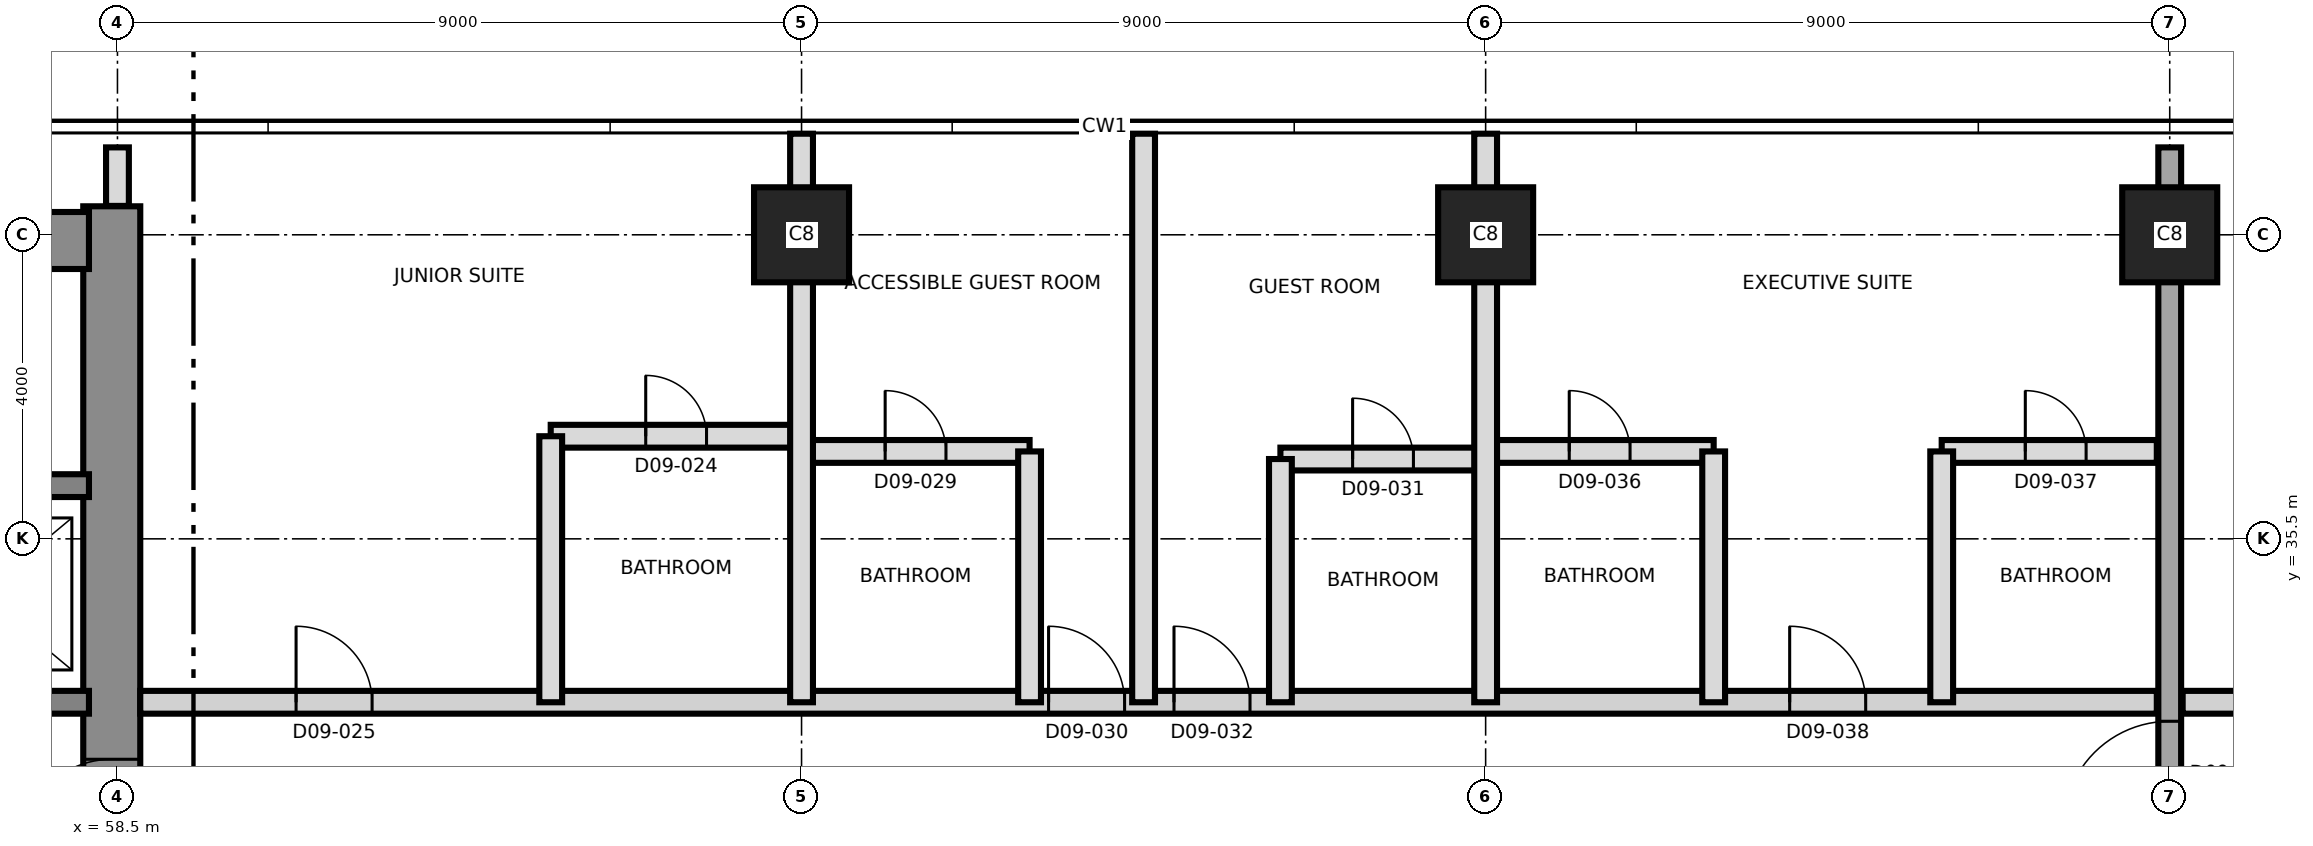
"""IFC4 building model, lengths in metres.
Left out: names, types, materials, properties, quantities, classifications, styles, units other than length and angle.
Written with IfcOpenShell. Run it as: python <this file> out.ifc"""

import sys

from ifc_helpers import new_model, si_unit, direction, frame, frame_2d, origin, origin_2d, place, context, subcontext, project, spatial, rectangle, extrude, element, fill, save


model = new_model("IFC4")
c1 = context("Model", 3, precision=1e-05, world=origin(), true_north=direction((0.0, 1.0)))
c2 = subcontext(c1, "Body", "Model", "MODEL_VIEW")
j1 = project(units=[si_unit("LENGTHUNIT", "METRE"), si_unit("PLANEANGLEUNIT", "RADIAN")], contexts=[c1])
p1 = place(None, origin())
s1 = spatial("IfcSite", under=j1, at=p1, CompositionType="ELEMENT")
p2 = place(p1, origin())
s2 = spatial("IfcBuilding", under=s1, at=p2, CompositionType="ELEMENT")
p3 = place(p2, frame((0.0, 0.0, 113.0)))
s3 = spatial("IfcBuildingStorey", under=s2, at=p3, CompositionType="ELEMENT", Elevation=113.0)
p4 = place(p3, frame((58.425, 21.125, 0.0), z_axis=(0.0, 0.0, 1.0), x_axis=(0.0, 1.0, 0.0)))
e1 = element("IfcWall", 1, at=p4, inside=s3, PredefinedType="SHEAR", context=c2, shape_type="SweptSolid", body=[
    extrude(rectangle(XDim=18.75, YDim=0.75, at=frame_2d((9.375, 0.0))), origin(), (0.0, 0.0, 1.0), 3.7),
])
p5 = place(p4, frame((10.275, 0.0, 0.0)))
e2 = element("IfcOpeningElement", 2, at=p5, cuts=e1, PredefinedType="OPENING", context=c2, shape_type="SweptSolid", body=[
    extrude(rectangle(XDim=1.2, YDim=2.1, at=frame_2d((0.6, 1.05))), frame((0.0, 0.385, 0.0), z_axis=(0.0, -1.0, 0.0), x_axis=(1.0, 0.0, 0.0)), (0.0, 0.0, 1.0), 0.77),
])
p6 = place(p3, frame((31.125, 39.425, 0.0), z_axis=(0.0, 0.0, 1.0), x_axis=(1.0, 0.0, 0.0)))
e3 = element("IfcWall", 3, at=p6, inside=s3, PredefinedType="SHEAR", context=c2, shape_type="SweptSolid", body=[
    extrude(rectangle(XDim=27.0, YDim=0.75, at=frame_2d((13.5, 0.0))), origin(), (0.0, 0.0, 1.0), 3.7),
])
p7 = place(p6, frame((10.575, 0.0, 0.0)))
e4 = element("IfcOpeningElement", 4, at=p7, cuts=e3, PredefinedType="OPENING", context=c2, shape_type="SweptSolid", body=[
    extrude(rectangle(XDim=1.2, YDim=2.1, at=frame_2d((0.6, 1.05))), frame((0.0, 0.385, 0.0), z_axis=(0.0, -1.0, 0.0), x_axis=(1.0, 0.0, 0.0)), (0.0, 0.0, 1.0), 0.77),
])
p8 = place(p3, frame((31.875, 33.35, 0.0), z_axis=(0.0, 0.0, 1.0), x_axis=(1.0, 0.0, 0.0)))
e5 = element("IfcWall", 5, at=p8, inside=s3, PredefinedType="SHEAR", context=c2, shape_type="SweptSolid", body=[
    extrude(rectangle(XDim=26.25, YDim=0.3, at=frame_2d((13.125, 0.0))), origin(), (0.0, 0.0, 1.0), 3.7),
])
p9 = place(p8, frame((13.775, 0.0, 0.0)))
e6 = element("IfcOpeningElement", 6, at=p9, cuts=e5, PredefinedType="OPENING", context=c2, shape_type="SweptSolid", body=[
    extrude(rectangle(XDim=1.4, YDim=2.1, at=frame_2d((0.7, 1.05))), frame((0.0, 0.16, 0.0), z_axis=(0.0, -1.0, 0.0), x_axis=(1.0, 0.0, 0.0)), (0.0, 0.0, 1.0), 0.32),
])
p10 = place(p8, frame((5.25, 0.0, 0.0)))
e7 = element("IfcOpeningElement", 7, at=p10, cuts=e5, PredefinedType="OPENING", context=c2, shape_type="SweptSolid", body=[
    extrude(rectangle(XDim=1.2, YDim=2.1, at=frame_2d((0.6, 1.05))), frame((0.0, 0.16, 0.0), z_axis=(0.0, -1.0, 0.0), x_axis=(1.0, 0.0, 0.0)), (0.0, 0.0, 1.0), 0.32),
])
p11 = place(p8, frame((19.8, 0.0, 0.0)))
e8 = element("IfcOpeningElement", 8, at=p11, cuts=e5, PredefinedType="OPENING", context=c2, shape_type="SweptSolid", body=[
    extrude(rectangle(XDim=1.2, YDim=2.1, at=frame_2d((0.6, 1.05))), frame((0.0, 0.16, 0.0), z_axis=(0.0, -1.0, 0.0), x_axis=(1.0, 0.0, 0.0)), (0.0, 0.0, 1.0), 0.32),
])
p12 = place(p3, frame((43.5, 36.2, 0.0), z_axis=(0.0, 0.0, 1.0), x_axis=(1.0, 0.0, 0.0)))
e9 = element("IfcWall", 9, at=p12, inside=s3, PredefinedType="SHEAR", context=c2, shape_type="SweptSolid", body=[
    extrude(rectangle(XDim=14.625, YDim=0.3, at=frame_2d((7.312, 0.0))), origin(), (0.0, 0.0, 1.0), 3.7),
])
p13 = place(p12, frame((6.9, 0.0, 0.0)))
e10 = element("IfcOpeningElement", 10, at=p13, cuts=e9, PredefinedType="OPENING", context=c2, shape_type="SweptSolid", body=[
    extrude(rectangle(XDim=1.2, YDim=2.1, at=frame_2d((0.6, 1.05))), frame((0.0, 0.16, 0.0), z_axis=(0.0, -1.0, 0.0), x_axis=(1.0, 0.0, 0.0)), (0.0, 0.0, 1.0), 0.32),
])
p14 = place(p12, frame((0.7, 0.0, 0.0)))
e11 = element("IfcOpeningElement", 11, at=p14, cuts=e9, PredefinedType="OPENING", context=c2, shape_type="SweptSolid", body=[
    extrude(rectangle(XDim=1.3, YDim=2.4, at=frame_2d((0.65, 1.2))), frame((0.0, 0.16, 0.0), z_axis=(0.0, -1.0, 0.0), x_axis=(1.0, 0.0, 0.0)), (0.0, 0.0, 1.0), 0.32),
])
p15 = place(p12, frame((3.7, 0.0, 0.0)))
e12 = element("IfcOpeningElement", 12, at=p15, cuts=e9, PredefinedType="OPENING", context=c2, shape_type="SweptSolid", body=[
    extrude(rectangle(XDim=1.3, YDim=2.4, at=frame_2d((0.65, 1.2))), frame((0.0, 0.16, 0.0), z_axis=(0.0, -1.0, 0.0), x_axis=(1.0, 0.0, 0.0)), (0.0, 0.0, 1.0), 0.32),
])
for number, where, z_axis, x_axis in (
    (13, (67.5, 39.5, 0.0), (0.0, 0.0, 1.0), (1.0, 0.0, 0.0)),
    (14, (76.5, 39.5, 0.0), (0.0, 0.0, 1.0), (1.0, 0.0, 0.0)),
    (15, (85.5, 39.5, 0.0), (0.0, 0.0, 1.0), (1.0, 0.0, 0.0)),
):
    element("IfcColumn", number, at=place(p3, frame(where, z_axis=z_axis, x_axis=x_axis)), inside=s3, PredefinedType="COLUMN", context=c2, shape_type="SweptSolid", body=[
        extrude(rectangle(XDim=1.25, YDim=1.25, at=origin_2d()), origin(), (0.0, 0.0, 1.0), 3.7),
    ])
p16 = place(p3, frame((85.5, 20.35, 0.0), z_axis=(0.0, 0.0, 1.0), x_axis=(0.0, 1.0, 0.0)))
e16 = element("IfcWall", 16, at=p16, inside=s3, PredefinedType="SHEAR", context=c2, shape_type="SweptSolid", body=[
    extrude(rectangle(XDim=20.3, YDim=0.3, at=frame_2d((10.15, 0.0))), origin(), (0.0, 0.0, 1.0), 3.7),
])
p17 = place(p16, frame((11.35, 0.0, 0.0)))
e17 = element("IfcOpeningElement", 17, at=p17, cuts=e16, PredefinedType="OPENING", context=c2, shape_type="SweptSolid", body=[
    extrude(rectangle(XDim=1.4, YDim=2.1, at=frame_2d((0.7, 1.05))), frame((0.0, 0.16, 0.0), z_axis=(0.0, -1.0, 0.0), x_axis=(1.0, 0.0, 0.0)), (0.0, 0.0, 1.0), 0.32),
])
p18 = place(p3, frame((58.8, 33.35, 0.0), z_axis=(0.0, 0.0, 1.0), x_axis=(1.0, 0.0, 0.0)))
e18 = element("IfcWall", 18, at=p18, inside=s3, PredefinedType="PARTITIONING", context=c2, shape_type="SweptSolid", body=[
    extrude(rectangle(XDim=26.53, YDim=0.3, at=frame_2d((13.265, 0.0))), origin(), (0.0, 0.0, 1.0), 3.4),
])
p19 = place(p18, frame((2.05, 0.0, 0.0)))
e19 = element("IfcOpeningElement", 19, at=p19, cuts=e18, PredefinedType="OPENING", context=c2, shape_type="SweptSolid", body=[
    extrude(rectangle(XDim=1.0, YDim=2.4, at=frame_2d((0.5, 1.2))), frame((0.0, 0.16, 0.0), z_axis=(0.0, -1.0, 0.0), x_axis=(1.0, 0.0, 0.0)), (0.0, 0.0, 1.0), 0.32),
])
p20 = place(p18, frame((11.95, 0.0, 0.0)))
e20 = element("IfcOpeningElement", 20, at=p20, cuts=e18, PredefinedType="OPENING", context=c2, shape_type="SweptSolid", body=[
    extrude(rectangle(XDim=1.0, YDim=2.1, at=frame_2d((0.5, 1.05))), frame((0.0, 0.16, 0.0), z_axis=(0.0, -1.0, 0.0), x_axis=(1.0, 0.0, 0.0)), (0.0, 0.0, 1.0), 0.32),
])
p21 = place(p18, frame((13.6, 0.0, 0.0)))
e21 = element("IfcOpeningElement", 21, at=p21, cuts=e18, PredefinedType="OPENING", context=c2, shape_type="SweptSolid", body=[
    extrude(rectangle(XDim=1.0, YDim=2.1, at=frame_2d((0.5, 1.05))), frame((0.0, 0.16, 0.0), z_axis=(0.0, -1.0, 0.0), x_axis=(1.0, 0.0, 0.0)), (0.0, 0.0, 1.0), 0.32),
])
p22 = place(p18, frame((21.7, 0.0, 0.0)))
e22 = element("IfcOpeningElement", 22, at=p22, cuts=e18, PredefinedType="OPENING", context=c2, shape_type="SweptSolid", body=[
    extrude(rectangle(XDim=1.0, YDim=2.4, at=frame_2d((0.5, 1.2))), frame((0.0, 0.16, 0.0), z_axis=(0.0, -1.0, 0.0), x_axis=(1.0, 0.0, 0.0)), (0.0, 0.0, 1.0), 0.32),
])
p23 = place(p3, frame((85.67, 33.35, 0.0), z_axis=(0.0, 0.0, 1.0), x_axis=(1.0, 0.0, 0.0)))
e23 = element("IfcWall", 23, at=p23, inside=s3, PredefinedType="PARTITIONING", context=c2, shape_type="SweptSolid", body=[
    extrude(rectangle(XDim=9.58, YDim=0.3, at=frame_2d((4.79, 0.0))), origin(), (0.0, 0.0, 1.0), 3.4),
])
p24 = place(p23, frame((1.83, 0.0, 0.0)))
e24 = element("IfcOpeningElement", 24, at=p24, cuts=e23, PredefinedType="OPENING", context=c2, shape_type="SweptSolid", body=[
    extrude(rectangle(XDim=1.0, YDim=2.1, at=frame_2d((0.5, 1.05))), frame((0.0, 0.16, 0.0), z_axis=(0.0, -1.0, 0.0), x_axis=(1.0, 0.0, 0.0)), (0.0, 0.0, 1.0), 0.32),
])
p25 = place(p23, frame((5.63, 0.0, 0.0)))
e25 = element("IfcOpeningElement", 25, at=p25, cuts=e23, PredefinedType="OPENING", context=c2, shape_type="SweptSolid", body=[
    extrude(rectangle(XDim=1.0, YDim=2.1, at=frame_2d((0.5, 1.05))), frame((0.0, 0.16, 0.0), z_axis=(0.0, -1.0, 0.0), x_axis=(1.0, 0.0, 0.0)), (0.0, 0.0, 1.0), 0.32),
])
p26 = place(p3, frame((73.8, 36.55, 0.0), z_axis=(0.0, 0.0, 1.0), x_axis=(1.0, 0.0, 0.0)))
e26 = element("IfcWall", 26, at=p26, inside=s3, PredefinedType="PARTITIONING", context=c2, shape_type="SweptSolid", body=[
    extrude(rectangle(XDim=2.7, YDim=0.3, at=frame_2d((1.35, 0.0))), origin(), (0.0, 0.0, 1.0), 3.4),
])
p27 = place(p26, frame((0.95, 0.0, 0.0)))
e27 = element("IfcOpeningElement", 27, at=p27, cuts=e26, PredefinedType="OPENING", context=c2, shape_type="SweptSolid", body=[
    extrude(rectangle(XDim=0.8, YDim=2.1, at=frame_2d((0.4, 1.05))), frame((0.0, 0.16, 0.0), z_axis=(0.0, -1.0, 0.0), x_axis=(1.0, 0.0, 0.0)), (0.0, 0.0, 1.0), 0.32),
])
p28 = place(p3, frame((67.5, 36.65, 0.0), z_axis=(0.0, 0.0, 1.0), x_axis=(1.0, 0.0, 0.0)))
e28 = element("IfcWall", 28, at=p28, inside=s3, PredefinedType="PARTITIONING", context=c2, shape_type="SweptSolid", body=[
    extrude(rectangle(XDim=3.0, YDim=0.3, at=frame_2d((1.5, 0.0))), origin(), (0.0, 0.0, 1.0), 3.4),
])
p29 = place(p28, frame((1.1, 0.0, 0.0)))
e29 = element("IfcOpeningElement", 29, at=p29, cuts=e28, PredefinedType="OPENING", context=c2, shape_type="SweptSolid", body=[
    extrude(rectangle(XDim=0.8, YDim=2.1, at=frame_2d((0.4, 1.05))), frame((0.0, 0.16, 0.0), z_axis=(0.0, -1.0, 0.0), x_axis=(1.0, 0.0, 0.0)), (0.0, 0.0, 1.0), 0.32),
])
p30 = place(p3, frame((76.5, 36.65, 0.0), z_axis=(0.0, 0.0, 1.0), x_axis=(1.0, 0.0, 0.0)))
e30 = element("IfcWall", 30, at=p30, inside=s3, PredefinedType="PARTITIONING", context=c2, shape_type="SweptSolid", body=[
    extrude(rectangle(XDim=3.0, YDim=0.3, at=frame_2d((1.5, 0.0))), origin(), (0.0, 0.0, 1.0), 3.4),
])
p31 = place(p30, frame((1.1, 0.0, 0.0)))
e31 = element("IfcOpeningElement", 31, at=p31, cuts=e30, PredefinedType="OPENING", context=c2, shape_type="SweptSolid", body=[
    extrude(rectangle(XDim=0.8, YDim=2.1, at=frame_2d((0.4, 1.05))), frame((0.0, 0.16, 0.0), z_axis=(0.0, -1.0, 0.0), x_axis=(1.0, 0.0, 0.0)), (0.0, 0.0, 1.0), 0.32),
])
p32 = place(p3, frame((82.5, 36.65, 0.0), z_axis=(0.0, 0.0, 1.0), x_axis=(1.0, 0.0, 0.0)))
e32 = element("IfcWall", 32, at=p32, inside=s3, PredefinedType="PARTITIONING", context=c2, shape_type="SweptSolid", body=[
    extrude(rectangle(XDim=2.83, YDim=0.3, at=frame_2d((1.415, 0.0))), origin(), (0.0, 0.0, 1.0), 3.4),
])
p33 = place(p32, frame((1.1, 0.0, 0.0)))
e33 = element("IfcOpeningElement", 33, at=p33, cuts=e32, PredefinedType="OPENING", context=c2, shape_type="SweptSolid", body=[
    extrude(rectangle(XDim=0.8, YDim=2.1, at=frame_2d((0.4, 1.05))), frame((0.0, 0.16, 0.0), z_axis=(0.0, -1.0, 0.0), x_axis=(1.0, 0.0, 0.0)), (0.0, 0.0, 1.0), 0.32),
])
p34 = place(p3, frame((64.2, 36.85, 0.0), z_axis=(0.0, 0.0, 1.0), x_axis=(1.0, 0.0, 0.0)))
e34 = element("IfcWall", 34, at=p34, inside=s3, PredefinedType="PARTITIONING", context=c2, shape_type="SweptSolid", body=[
    extrude(rectangle(XDim=3.3, YDim=0.3, at=frame_2d((1.65, 0.0))), origin(), (0.0, 0.0, 1.0), 3.4),
])
p35 = place(p34, frame((1.25, 0.0, 0.0)))
e35 = element("IfcOpeningElement", 35, at=p35, cuts=e34, PredefinedType="OPENING", context=c2, shape_type="SweptSolid", body=[
    extrude(rectangle(XDim=0.8, YDim=2.1, at=frame_2d((0.4, 1.05))), frame((0.0, 0.16, 0.0), z_axis=(0.0, -1.0, 0.0), x_axis=(1.0, 0.0, 0.0)), (0.0, 0.0, 1.0), 0.32),
])
p36 = place(p3, frame((58.5, 39.88, 0.0), z_axis=(0.0, 0.0, 1.0), x_axis=(0.0, 1.0, 0.0)))
e36 = element("IfcWall", 36, at=p36, inside=s3, PredefinedType="PARTITIONING", context=c2, shape_type="SweptSolid", body=[
    extrude(rectangle(XDim=0.77, YDim=0.3, at=frame_2d((0.385, 0.0))), origin(), (0.0, 0.0, 1.0), 3.4),
])
p37 = place(p3, frame((64.2, 33.35, 0.0), z_axis=(0.0, 0.0, 1.0), x_axis=(0.0, 1.0, 0.0)))
e37 = element("IfcWall", 37, at=p37, inside=s3, PredefinedType="PARTITIONING", context=c2, shape_type="SweptSolid", body=[
    extrude(rectangle(XDim=3.5, YDim=0.3, at=frame_2d((1.75, 0.0))), origin(), (0.0, 0.0, 1.0), 3.4),
])
p38 = place(p3, frame((67.5, 33.35, 0.0), z_axis=(0.0, 0.0, 1.0), x_axis=(0.0, 1.0, 0.0)))
e38 = element("IfcWall", 38, at=p38, inside=s3, PredefinedType="PARTITIONING", context=c2, shape_type="SweptSolid", body=[
    extrude(rectangle(XDim=7.48, YDim=0.3, at=frame_2d((3.74, 0.0))), origin(), (0.0, 0.0, 1.0), 3.4),
])
p39 = place(p3, frame((70.5, 33.35, 0.0), z_axis=(0.0, 0.0, 1.0), x_axis=(0.0, 1.0, 0.0)))
e39 = element("IfcWall", 39, at=p39, inside=s3, PredefinedType="PARTITIONING", context=c2, shape_type="SweptSolid", body=[
    extrude(rectangle(XDim=3.3, YDim=0.3, at=frame_2d((1.65, 0.0))), origin(), (0.0, 0.0, 1.0), 3.4),
])
p40 = place(p3, frame((72.0, 33.35, 0.0), z_axis=(0.0, 0.0, 1.0), x_axis=(0.0, 1.0, 0.0)))
e40 = element("IfcWall", 40, at=p40, inside=s3, PredefinedType="PARTITIONING", context=c2, shape_type="SweptSolid", body=[
    extrude(rectangle(XDim=7.48, YDim=0.3, at=frame_2d((3.74, 0.0))), origin(), (0.0, 0.0, 1.0), 3.4),
])
p41 = place(p3, frame((73.8, 33.35, 0.0), z_axis=(0.0, 0.0, 1.0), x_axis=(0.0, 1.0, 0.0)))
e41 = element("IfcWall", 41, at=p41, inside=s3, PredefinedType="PARTITIONING", context=c2, shape_type="SweptSolid", body=[
    extrude(rectangle(XDim=3.2, YDim=0.3, at=frame_2d((1.6, 0.0))), origin(), (0.0, 0.0, 1.0), 3.4),
])
p42 = place(p3, frame((76.5, 33.35, 0.0), z_axis=(0.0, 0.0, 1.0), x_axis=(0.0, 1.0, 0.0)))
e42 = element("IfcWall", 42, at=p42, inside=s3, PredefinedType="PARTITIONING", context=c2, shape_type="SweptSolid", body=[
    extrude(rectangle(XDim=7.48, YDim=0.3, at=frame_2d((3.74, 0.0))), origin(), (0.0, 0.0, 1.0), 3.4),
])
for number, where, z_axis, x_axis in (
    (43, (79.5, 33.35, 0.0), (0.0, 0.0, 1.0), (0.0, 1.0, 0.0)),
    (44, (82.5, 33.35, 0.0), (0.0, 0.0, 1.0), (0.0, 1.0, 0.0)),
):
    element("IfcWall", number, at=place(p3, frame(where, z_axis=z_axis, x_axis=x_axis)), inside=s3, PredefinedType="PARTITIONING", context=c2, shape_type="SweptSolid", body=[
        extrude(rectangle(XDim=3.3, YDim=0.3, at=frame_2d((1.65, 0.0))), origin(), (0.0, 0.0, 1.0), 3.4),
    ])
p43 = place(p5, origin())
e45 = element("IfcDoor", 45, at=p43, inside=s3, OperationType="SINGLE_SWING_LEFT", PredefinedType="DOOR", context=c2, shape_type="SweptSolid", body=[
    extrude(rectangle(XDim=1.2, YDim=2.1, at=frame_2d((0.6, 1.05))), frame((0.0, 0.025, 0.0), z_axis=(0.0, -1.0, 0.0), x_axis=(1.0, 0.0, 0.0)), (0.0, 0.0, 1.0), 0.05),
])
fill(e2, e45)
p44 = place(p35, origin())
e46 = element("IfcDoor", 46, at=p44, inside=s3, OperationType="SINGLE_SWING_LEFT", PredefinedType="DOOR", context=c2, shape_type="SweptSolid", body=[
    extrude(rectangle(XDim=0.8, YDim=2.1, at=frame_2d((0.4, 1.05))), frame((0.0, 0.025, 0.0), z_axis=(0.0, -1.0, 0.0), x_axis=(1.0, 0.0, 0.0)), (0.0, 0.0, 1.0), 0.05),
])
fill(e35, e46)
p45 = place(p19, origin())
e47 = element("IfcDoor", 47, at=p45, inside=s3, OperationType="SINGLE_SWING_LEFT", PredefinedType="DOOR", context=c2, shape_type="SweptSolid", body=[
    extrude(rectangle(XDim=1.0, YDim=2.4, at=frame_2d((0.5, 1.2))), frame((0.0, 0.025, 0.0), z_axis=(0.0, -1.0, 0.0), x_axis=(1.0, 0.0, 0.0)), (0.0, 0.0, 1.0), 0.05),
])
fill(e19, e47)
p46 = place(p29, origin())
e48 = element("IfcDoor", 48, at=p46, inside=s3, OperationType="SINGLE_SWING_LEFT", PredefinedType="DOOR", context=c2, shape_type="SweptSolid", body=[
    extrude(rectangle(XDim=0.8, YDim=2.1, at=frame_2d((0.4, 1.05))), frame((0.0, 0.025, 0.0), z_axis=(0.0, -1.0, 0.0), x_axis=(1.0, 0.0, 0.0)), (0.0, 0.0, 1.0), 0.05),
])
fill(e29, e48)
p47 = place(p20, origin())
e49 = element("IfcDoor", 49, at=p47, inside=s3, OperationType="SINGLE_SWING_RIGHT", PredefinedType="DOOR", context=c2, shape_type="SweptSolid", body=[
    extrude(rectangle(XDim=1.0, YDim=2.1, at=frame_2d((0.5, 1.05))), frame((0.0, 0.025, 0.0), z_axis=(0.0, -1.0, 0.0), x_axis=(1.0, 0.0, 0.0)), (0.0, 0.0, 1.0), 0.05),
])
fill(e20, e49)
p48 = place(p27, origin())
e50 = element("IfcDoor", 50, at=p48, inside=s3, OperationType="SINGLE_SWING_RIGHT", PredefinedType="DOOR", context=c2, shape_type="SweptSolid", body=[
    extrude(rectangle(XDim=0.8, YDim=2.1, at=frame_2d((0.4, 1.05))), frame((0.0, 0.025, 0.0), z_axis=(0.0, -1.0, 0.0), x_axis=(1.0, 0.0, 0.0)), (0.0, 0.0, 1.0), 0.05),
])
fill(e27, e50)
p49 = place(p21, origin())
e51 = element("IfcDoor", 51, at=p49, inside=s3, OperationType="SINGLE_SWING_LEFT", PredefinedType="DOOR", context=c2, shape_type="SweptSolid", body=[
    extrude(rectangle(XDim=1.0, YDim=2.1, at=frame_2d((0.5, 1.05))), frame((0.0, 0.025, 0.0), z_axis=(0.0, -1.0, 0.0), x_axis=(1.0, 0.0, 0.0)), (0.0, 0.0, 1.0), 0.05),
])
fill(e21, e51)
p50 = place(p31, origin())
e52 = element("IfcDoor", 52, at=p50, inside=s3, OperationType="SINGLE_SWING_LEFT", PredefinedType="DOOR", context=c2, shape_type="SweptSolid", body=[
    extrude(rectangle(XDim=0.8, YDim=2.1, at=frame_2d((0.4, 1.05))), frame((0.0, 0.025, 0.0), z_axis=(0.0, -1.0, 0.0), x_axis=(1.0, 0.0, 0.0)), (0.0, 0.0, 1.0), 0.05),
])
fill(e31, e52)
p51 = place(p33, origin())
e53 = element("IfcDoor", 53, at=p51, inside=s3, OperationType="SINGLE_SWING_RIGHT", PredefinedType="DOOR", context=c2, shape_type="SweptSolid", body=[
    extrude(rectangle(XDim=0.8, YDim=2.1, at=frame_2d((0.4, 1.05))), frame((0.0, 0.025, 0.0), z_axis=(0.0, -1.0, 0.0), x_axis=(1.0, 0.0, 0.0)), (0.0, 0.0, 1.0), 0.05),
])
fill(e33, e53)
p52 = place(p22, origin())
e54 = element("IfcDoor", 54, at=p52, inside=s3, OperationType="SINGLE_SWING_LEFT", PredefinedType="DOOR", context=c2, shape_type="SweptSolid", body=[
    extrude(rectangle(XDim=1.0, YDim=2.4, at=frame_2d((0.5, 1.2))), frame((0.0, 0.025, 0.0), z_axis=(0.0, -1.0, 0.0), x_axis=(1.0, 0.0, 0.0)), (0.0, 0.0, 1.0), 0.05),
])
fill(e22, e54)
p53 = place(p17, origin())
e55 = element("IfcDoor", 55, at=p53, inside=s3, OperationType="SINGLE_SWING_RIGHT", PredefinedType="DOOR", context=c2, shape_type="SweptSolid", body=[
    extrude(rectangle(XDim=1.4, YDim=2.1, at=frame_2d((0.7, 1.05))), frame((0.0, 0.025, 0.0), z_axis=(0.0, -1.0, 0.0), x_axis=(1.0, 0.0, 0.0)), (0.0, 0.0, 1.0), 0.05),
])
fill(e17, e55)
save(model, sys.argv[1])
